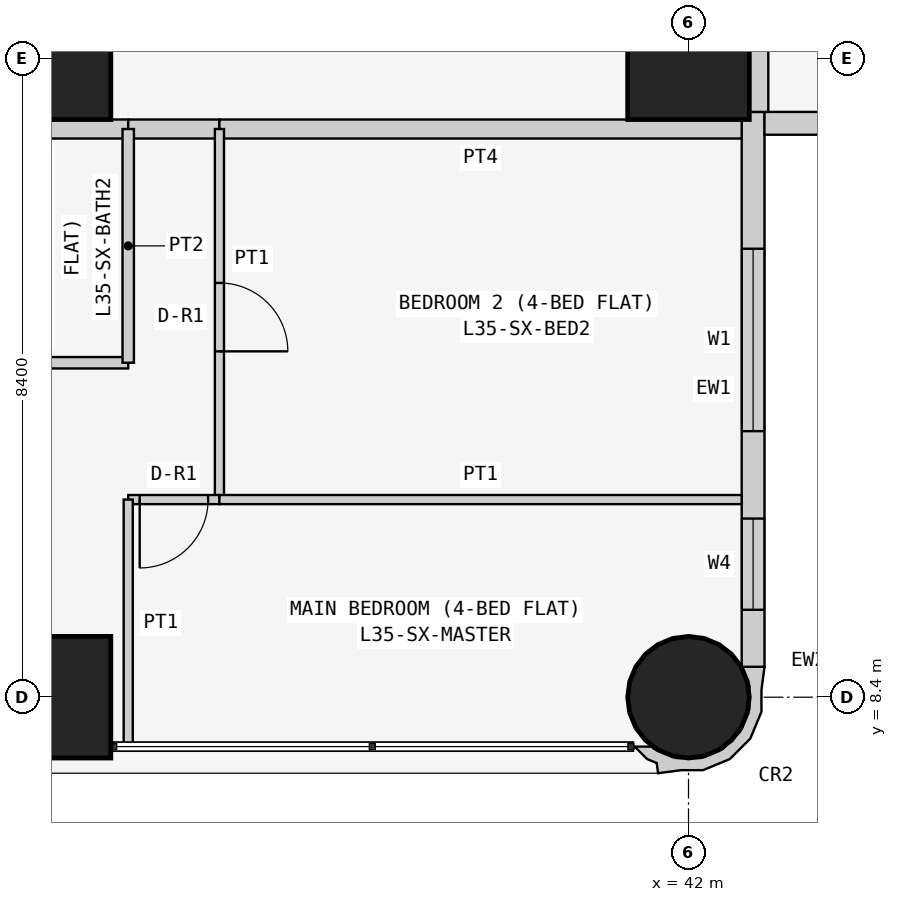
"""IFC4 building model, lengths in metres.
Left out: names, types, materials, properties, quantities, classifications, styles, units other than length and angle.
Written with IfcOpenShell. Run it as: python <this file> out.ifc"""

import sys

from ifc_helpers import new_model, si_unit, direction, frame, frame_2d, origin, origin_2d, place, context, subcontext, project, spatial, polyline, rectangle, circle, outline, extrude, element, fill, save


model = new_model("IFC4")
c1 = context("Model", 3, precision=1e-05, world=origin(), true_north=direction((0.0, 1.0)))
c2 = subcontext(c1, "Body", "Model", "MODEL_VIEW")
j1 = project(units=[si_unit("LENGTHUNIT", "METRE"), si_unit("PLANEANGLEUNIT", "RADIAN")], contexts=[c1])
p1 = place(None, origin())
s1 = spatial("IfcSite", under=j1, at=p1, CompositionType="ELEMENT")
p2 = place(p1, origin())
s2 = spatial("IfcBuilding", under=s1, at=p2, CompositionType="ELEMENT")
p3 = place(p2, frame((0.0, 0.0, 137.7)))
s3 = spatial("IfcBuildingStorey", under=s2, at=p3, CompositionType="ELEMENT", Elevation=137.7)
for number, where, z_axis, x_axis in (
    (1, (33.6, 8.4, 0.0), (0.0, 0.0, 1.0), (1.0, 0.0, 0.0)),
    (2, (33.6, 16.8, 0.0), (0.0, 0.0, 1.0), (1.0, 0.0, 0.0)),
):
    element("IfcColumn", number, at=place(p3, frame(where, z_axis=z_axis, x_axis=x_axis)), inside=s3, PredefinedType="COLUMN", context=c2, shape_type="SweptSolid", body=[
        extrude(rectangle(XDim=1.6, YDim=1.6, at=origin_2d()), origin(), (0.0, 0.0, 1.0), 3.6),
    ])
p4 = place(p3, frame((42.0, 8.4, 0.0), z_axis=(0.0, 0.0, 1.0), x_axis=(1.0, 0.0, 0.0)))
e3 = element("IfcColumn", 3, at=p4, inside=s3, PredefinedType="COLUMN", context=c2, shape_type="SweptSolid", body=[
    extrude(circle(Radius=0.8, at=origin_2d()), origin(), (0.0, 0.0, 1.0), 3.6),
])
p5 = place(p3, frame((42.0, 16.8, 0.0), z_axis=(0.0, 0.0, 1.0), x_axis=(1.0, 0.0, 0.0)))
e4 = element("IfcColumn", 4, at=p5, inside=s3, PredefinedType="COLUMN", context=c2, shape_type="SweptSolid", body=[
    extrude(rectangle(XDim=1.6, YDim=1.6, at=origin_2d()), origin(), (0.0, 0.0, 1.0), 3.6),
])
p6 = place(p3, frame((42.85, 8.8, 0.0), z_axis=(0.0, 0.0, 1.0), x_axis=(0.0, 1.0, 0.0)))
e5 = element("IfcWall", 5, at=p6, inside=s3, PredefinedType="SOLIDWALL", context=c2, shape_type="SweptSolid", body=[
    extrude(rectangle(XDim=7.3, YDim=0.3, at=frame_2d((3.65, 0.0))), origin(), (0.0, 0.0, 1.0), 3.45),
])
p7 = place(p6, frame((3.1, 0.0, 0.9)))
e6 = element("IfcOpeningElement", 6, at=p7, cuts=e5, PredefinedType="OPENING", context=c2, shape_type="SweptSolid", body=[
    extrude(rectangle(XDim=2.4, YDim=1.5, at=frame_2d((1.2, 0.75))), frame((0.0, 0.16, 0.0), z_axis=(0.0, -1.0, 0.0), x_axis=(1.0, 0.0, 0.0)), (0.0, 0.0, 1.0), 0.32),
])
p8 = place(p6, frame((0.75, 0.0, 0.9)))
e7 = element("IfcOpeningElement", 7, at=p8, cuts=e5, PredefinedType="OPENING", context=c2, shape_type="SweptSolid", body=[
    extrude(rectangle(XDim=1.2, YDim=1.5, at=frame_2d((0.6, 0.75))), frame((0.0, 0.16, 0.0), z_axis=(0.0, -1.0, 0.0), x_axis=(1.0, 0.0, 0.0)), (0.0, 0.0, 1.0), 0.32),
])
p9 = place(p3, frame((43.0, 15.95, 0.0), z_axis=(0.0, 0.0, 1.0), x_axis=(1.0, 0.0, 0.0)))
e8 = element("IfcWall", 8, at=p9, inside=s3, PredefinedType="SOLIDWALL", context=c2, shape_type="SweptSolid", body=[
    extrude(rectangle(XDim=15.4, YDim=0.3, at=frame_2d((7.7, 0.0))), origin(), (0.0, 0.0, 1.0), 3.45),
])
p10 = place(p9, frame((1.2, 0.0, 0.9)))
e9 = element("IfcOpeningElement", 9, at=p10, cuts=e8, PredefinedType="OPENING", context=c2, shape_type="SweptSolid", body=[
    extrude(rectangle(XDim=1.8, YDim=1.5, at=frame_2d((0.9, 0.75))), frame((0.0, 0.16, 0.0), z_axis=(0.0, -1.0, 0.0), x_axis=(1.0, 0.0, 0.0)), (0.0, 0.0, 1.0), 0.32),
])
p11 = place(p9, frame((4.95, 0.0, 1.5)))
e10 = element("IfcOpeningElement", 10, at=p11, cuts=e8, PredefinedType="OPENING", context=c2, shape_type="SweptSolid", body=[
    extrude(rectangle(XDim=0.9, YDim=0.7, at=frame_2d((0.45, 0.35))), frame((0.0, 0.16, 0.0), z_axis=(0.0, -1.0, 0.0), x_axis=(1.0, 0.0, 0.0)), (0.0, 0.0, 1.0), 0.32),
])
p12 = place(p9, frame((8.5, 0.0, 0.9)))
e11 = element("IfcOpeningElement", 11, at=p12, cuts=e8, PredefinedType="OPENING", context=c2, shape_type="SweptSolid", body=[
    extrude(rectangle(XDim=1.8, YDim=1.5, at=frame_2d((0.9, 0.75))), frame((0.0, 0.16, 0.0), z_axis=(0.0, -1.0, 0.0), x_axis=(1.0, 0.0, 0.0)), (0.0, 0.0, 1.0), 0.32),
])
p13 = place(p9, frame((12.5, 0.0, 0.0)))
e12 = element("IfcOpeningElement", 12, at=p13, cuts=e8, PredefinedType="OPENING", context=c2, shape_type="SweptSolid", body=[
    extrude(rectangle(XDim=0.9, YDim=2.4, at=frame_2d((0.45, 1.2))), frame((0.0, 0.16, 0.0), z_axis=(0.0, -1.0, 0.0), x_axis=(1.0, 0.0, 0.0)), (0.0, 0.0, 1.0), 0.32),
])
p14 = place(p9, frame((13.5, 0.0, 0.9)))
e13 = element("IfcOpeningElement", 13, at=p14, cuts=e8, PredefinedType="OPENING", context=c2, shape_type="SweptSolid", body=[
    extrude(rectangle(XDim=1.2, YDim=1.5, at=frame_2d((0.6, 0.75))), frame((0.0, 0.16, 0.0), z_axis=(0.0, -1.0, 0.0), x_axis=(1.0, 0.0, 0.0)), (0.0, 0.0, 1.0), 0.32),
])
p15 = place(p3, frame((41.352, 7.805, 0.0), z_axis=(0.0, 0.0, 1.0), x_axis=(0.343276641956, -0.93923434088, 0.0)))
e14 = element("IfcWall", 14, at=p15, inside=s3, PredefinedType="SOLIDWALL", context=c2, shape_type="SweptSolid", body=[
    extrude(outline(polyline([(-0.369, 1.89), (-0.509, 1.621), (-0.49, 1.615), (-0.479, 1.609), (-0.211, 1.62), (0.088, 1.511), (0.323, 1.295), (0.457, 1.006), (0.47, 0.688), (0.361, 0.389), (0.145, 0.154), (0.108, 0.136), (0.031, -0.075), (0.241, 0.023), (0.333, 0.124), (0.465, 0.094), (0.532, 0.393), (0.631, 0.663), (0.614, 1.044), (0.453, 1.391), (0.172, 1.649), (-0.097, 1.748), (-0.369, 1.89)])), origin(), (0.0, 0.0, 1.0), 3.45),
])
p16 = place(p3, frame((42.925, 22.971, 0.0), z_axis=(0.0, 0.0, 1.0), x_axis=(0.0, -1.0, 0.0)))
e15 = element("IfcWall", 15, at=p16, inside=s3, PredefinedType="PARTITIONING", context=c2, shape_type="SweptSolid", body=[
    extrude(rectangle(XDim=6.871, YDim=0.25, at=frame_2d((3.436, 0.0))), origin(), (0.0, 0.0, 1.0), 3.45),
])
p17 = place(p3, frame((34.629, 15.875, 0.0), z_axis=(0.0, 0.0, 1.0), x_axis=(-1.0, 0.0, 0.0)))
e16 = element("IfcWall", 16, at=p17, inside=s3, PredefinedType="PARTITIONING", context=c2, shape_type="SweptSolid", body=[
    extrude(rectangle(XDim=2.629, YDim=0.25, at=frame_2d((1.314, 0.0))), origin(), (0.0, 0.0, 1.0), 3.45),
])
p18 = place(p3, frame((35.829, 15.875, 0.0), z_axis=(0.0, 0.0, 1.0), x_axis=(-1.0, 0.0, 0.0)))
e17 = element("IfcWall", 17, at=p18, inside=s3, PredefinedType="PARTITIONING", context=c2, shape_type="SweptSolid", body=[
    extrude(rectangle(XDim=1.2, YDim=0.25, at=frame_2d((0.6, 0.0))), origin(), (0.0, 0.0, 1.0), 3.45),
])
p19 = place(p3, frame((42.7, 15.875, 0.0), z_axis=(0.0, 0.0, 1.0), x_axis=(-1.0, 0.0, 0.0)))
e18 = element("IfcWall", 18, at=p19, inside=s3, PredefinedType="PARTITIONING", context=c2, shape_type="SweptSolid", body=[
    extrude(rectangle(XDim=6.871, YDim=0.25, at=frame_2d((3.436, 0.0))), origin(), (0.0, 0.0, 1.0), 3.45),
])
p20 = place(p3, frame((32.0, 12.8, 0.0), z_axis=(0.0, 0.0, 1.0), x_axis=(1.0, 0.0, 0.0)))
e19 = element("IfcWall", 19, at=p20, inside=s3, PredefinedType="PARTITIONING", context=c2, shape_type="SweptSolid", body=[
    extrude(rectangle(XDim=2.629, YDim=0.15, at=frame_2d((1.314, 0.0))), origin(), (0.0, 0.0, 1.0), 3.45),
])
p21 = place(p3, frame((34.629, 12.8, 0.0), z_axis=(0.0, 0.0, 1.0), x_axis=(0.0, 1.0, 0.0)))
e20 = element("IfcWall", 20, at=p21, inside=s3, PredefinedType="PARTITIONING", context=c2, shape_type="SweptSolid", body=[
    extrude(rectangle(XDim=3.075, YDim=0.15, at=frame_2d((1.538, 0.0))), origin(), (0.0, 0.0, 1.0), 3.45),
])
p22 = place(p3, frame((35.829, 15.875, 0.0), z_axis=(0.0, 0.0, 1.0), x_axis=(0.0, -1.0, 0.0)))
e21 = element("IfcWall", 21, at=p22, inside=s3, PredefinedType="PARTITIONING", context=c2, shape_type="SweptSolid", body=[
    extrude(rectangle(XDim=4.875, YDim=0.12, at=frame_2d((2.438, 0.0))), origin(), (0.0, 0.0, 1.0), 3.45),
])
p23 = place(p22, frame((2.025, 0.0, 0.0)))
e22 = element("IfcOpeningElement", 22, at=p23, cuts=e21, PredefinedType="OPENING", context=c2, shape_type="SweptSolid", body=[
    extrude(rectangle(XDim=0.9, YDim=2.1, at=frame_2d((0.45, 1.05))), frame((0.0, 0.07, 0.0), z_axis=(0.0, -1.0, 0.0), x_axis=(1.0, 0.0, 0.0)), (0.0, 0.0, 1.0), 0.14),
])
p24 = place(p3, frame((35.829, 11.0, 0.0), z_axis=(0.0, 0.0, 1.0), x_axis=(-1.0, 0.0, 0.0)))
e23 = element("IfcWall", 23, at=p24, inside=s3, PredefinedType="PARTITIONING", context=c2, shape_type="SweptSolid", body=[
    extrude(rectangle(XDim=1.2, YDim=0.12, at=frame_2d((0.6, 0.0))), origin(), (0.0, 0.0, 1.0), 3.45),
])
p25 = place(p24, frame((0.149, 0.0, 0.0)))
e24 = element("IfcOpeningElement", 24, at=p25, cuts=e23, PredefinedType="OPENING", context=c2, shape_type="SweptSolid", body=[
    extrude(rectangle(XDim=0.9, YDim=2.1, at=frame_2d((0.45, 1.05))), frame((0.0, 0.07, 0.0), z_axis=(0.0, -1.0, 0.0), x_axis=(1.0, 0.0, 0.0)), (0.0, 0.0, 1.0), 0.14),
])
p26 = place(p3, frame((34.629, 11.0, 0.0), z_axis=(0.0, 0.0, 1.0), x_axis=(0.0, -1.0, 0.0)))
e25 = element("IfcWall", 25, at=p26, inside=s3, PredefinedType="PARTITIONING", context=c2, shape_type="SweptSolid", body=[
    extrude(rectangle(XDim=3.25, YDim=0.12, at=frame_2d((1.625, 0.0))), origin(), (0.0, 0.0, 1.0), 3.45),
])
p27 = place(p3, frame((35.829, 11.0, 0.0), z_axis=(0.0, 0.0, 1.0), x_axis=(1.0, 0.0, 0.0)))
e26 = element("IfcWall", 26, at=p27, inside=s3, PredefinedType="PARTITIONING", context=c2, shape_type="SweptSolid", body=[
    extrude(rectangle(XDim=6.871, YDim=0.12, at=frame_2d((3.436, 0.0))), origin(), (0.0, 0.0, 1.0), 3.45),
])
p28 = place(p7, origin())
e27 = element("IfcWindow", 27, at=p28, inside=s3, PartitioningType="SINGLE_PANEL", PredefinedType="WINDOW", context=c2, shape_type="SweptSolid", body=[
    extrude(rectangle(XDim=2.4, YDim=1.5, at=frame_2d((1.2, 0.75))), frame((0.0, 0.03, 0.0), z_axis=(0.0, -1.0, 0.0), x_axis=(1.0, 0.0, 0.0)), (0.0, 0.0, 1.0), 0.06),
])
fill(e6, e27)
p29 = place(p8, origin())
e28 = element("IfcWindow", 28, at=p29, inside=s3, PartitioningType="SINGLE_PANEL", PredefinedType="WINDOW", context=c2, shape_type="SweptSolid", body=[
    extrude(rectangle(XDim=1.2, YDim=1.5, at=frame_2d((0.6, 0.75))), frame((0.0, 0.03, 0.0), z_axis=(0.0, -1.0, 0.0), x_axis=(1.0, 0.0, 0.0)), (0.0, 0.0, 1.0), 0.06),
])
fill(e7, e28)
p30 = place(p23, origin())
e29 = element("IfcDoor", 29, at=p30, inside=s3, OperationType="SINGLE_SWING_RIGHT", PredefinedType="DOOR", context=c2, shape_type="SweptSolid", body=[
    extrude(rectangle(XDim=0.9, YDim=2.1, at=frame_2d((0.45, 1.05))), frame((0.0, 0.025, 0.0), z_axis=(0.0, -1.0, 0.0), x_axis=(1.0, 0.0, 0.0)), (0.0, 0.0, 1.0), 0.05),
])
fill(e22, e29)
p31 = place(p25, origin())
e30 = element("IfcDoor", 30, at=p31, inside=s3, OperationType="SINGLE_SWING_RIGHT", PredefinedType="DOOR", context=c2, shape_type="SweptSolid", body=[
    extrude(rectangle(XDim=0.9, YDim=2.1, at=frame_2d((0.45, 1.05))), frame((0.0, 0.025, 0.0), z_axis=(0.0, -1.0, 0.0), x_axis=(1.0, 0.0, 0.0)), (0.0, 0.0, 1.0), 0.05),
])
fill(e24, e30)
save(model, sys.argv[1])
